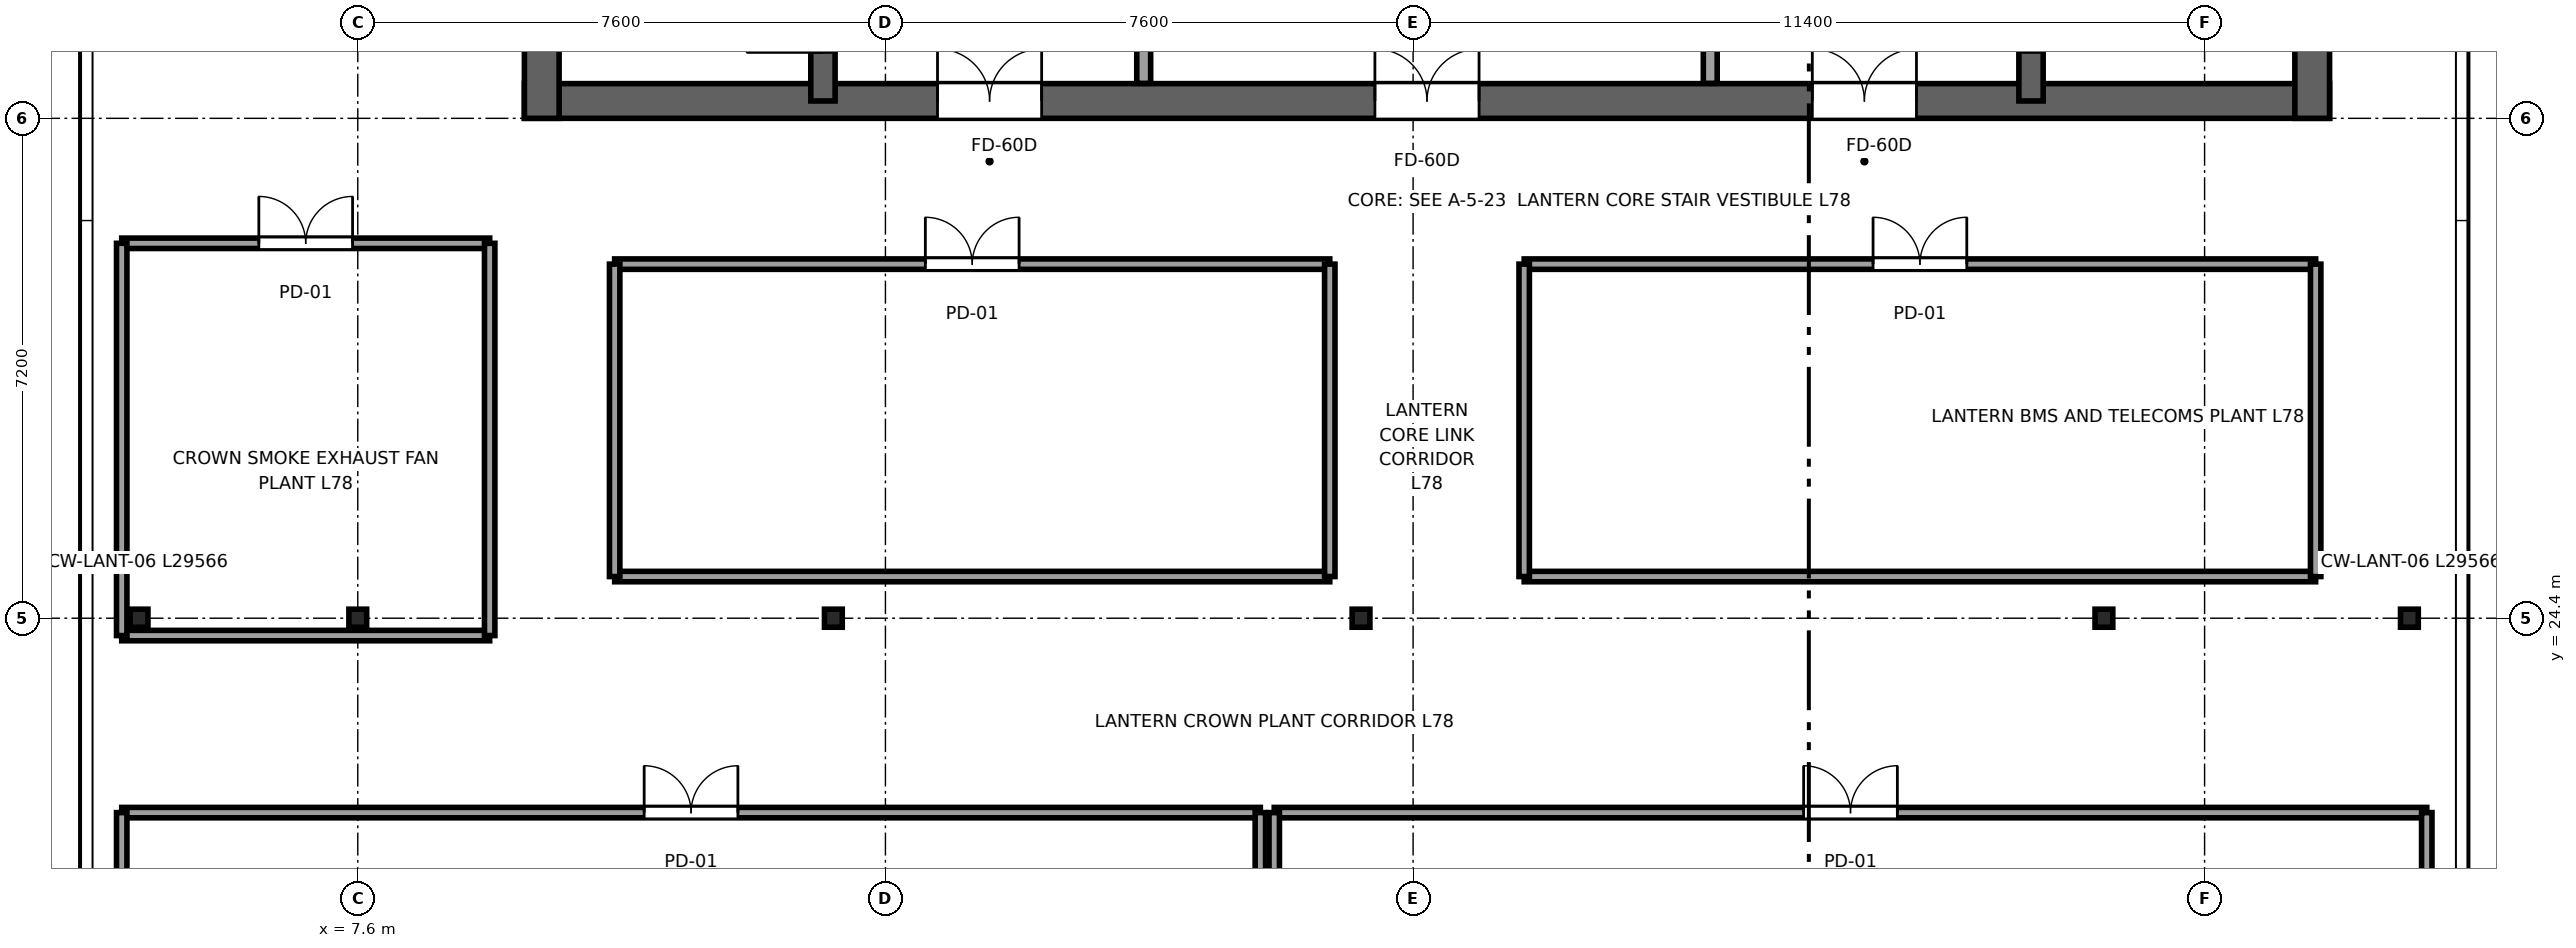
"""IFC4 building model, lengths in metres.
Left out: names, types, materials, properties, quantities, classifications, styles, units other than length and angle.
Written with IfcOpenShell. Run it as: python <this file> out.ifc"""

import sys

from ifc_helpers import new_model, si_unit, direction, frame, frame_2d, origin, origin_2d, place, context, subcontext, project, spatial, rectangle, i_section, extrude, source, transform, mapped, element, fill, save


model = new_model("IFC4")
c1 = context("Model", 3, precision=1e-05, world=origin(), true_north=direction((0.0, 1.0)))
c2 = subcontext(c1, "Body", "Model", "MODEL_VIEW")
j1 = project(units=[si_unit("LENGTHUNIT", "METRE"), si_unit("PLANEANGLEUNIT", "RADIAN")], contexts=[c1])
p1 = place(None, origin())
s1 = spatial("IfcSite", under=j1, at=p1, CompositionType="ELEMENT")
p2 = place(p1, origin())
s2 = spatial("IfcBuilding", under=s1, at=p2, CompositionType="ELEMENT")
p3 = place(p2, frame((0.0, 0.0, 294.75)))
s3 = spatial("IfcBuildingStorey", under=s2, at=p3, CompositionType="ELEMENT", Elevation=294.75)
p4 = place(p3, frame((10.0, 31.85, 0.0), z_axis=(0.0, 0.0, 1.0), x_axis=(1.0, 0.0, 0.0)))
e1 = element("IfcWall", 1, at=p4, inside=s3, PredefinedType="SHEAR", context=c2, shape_type="SweptSolid", body=[
    extrude(rectangle(XDim=26.0, YDim=0.5, at=frame_2d((13.0, 0.0))), origin(), (0.0, 0.0, 1.0), 3.8),
])
p5 = place(p4, frame((7.45, 0.0, 0.0), z_axis=(0.0, 0.0, 1.0), x_axis=(-1.0, 0.0, 0.0)))
e2 = element("IfcOpeningElement", 2, at=p5, cuts=e1, PredefinedType="OPENING", context=c2, shape_type="SweptSolid", body=[
    extrude(rectangle(XDim=1.5, YDim=2.04, at=frame_2d((0.75, 1.02))), frame((0.0, 0.26, 0.0), z_axis=(0.0, -1.0, 0.0), x_axis=(1.0, 0.0, 0.0)), (0.0, 0.0, 1.0), 0.52),
])
p6 = place(p4, frame((13.75, 0.0, 0.0), z_axis=(0.0, 0.0, 1.0), x_axis=(-1.0, 0.0, 0.0)))
e3 = element("IfcOpeningElement", 3, at=p6, cuts=e1, PredefinedType="OPENING", context=c2, shape_type="SweptSolid", body=[
    extrude(rectangle(XDim=1.5, YDim=2.04, at=frame_2d((0.75, 1.02))), frame((0.0, 0.26, 0.0), z_axis=(0.0, -1.0, 0.0), x_axis=(1.0, 0.0, 0.0)), (0.0, 0.0, 1.0), 0.52),
])
p7 = place(p4, frame((20.05, 0.0, 0.0), z_axis=(0.0, 0.0, 1.0), x_axis=(-1.0, 0.0, 0.0)))
e4 = element("IfcOpeningElement", 4, at=p7, cuts=e1, PredefinedType="OPENING", context=c2, shape_type="SweptSolid", body=[
    extrude(rectangle(XDim=1.5, YDim=2.04, at=frame_2d((0.75, 1.02))), frame((0.0, 0.26, 0.0), z_axis=(0.0, -1.0, 0.0), x_axis=(1.0, 0.0, 0.0)), (0.0, 0.0, 1.0), 0.52),
])
for number, where, z_axis, x_axis in (
    (5, (10.25, 31.6, 0.0), (0.0, 0.0, 1.0), (0.0, 1.0, 0.0)),
    (6, (35.75, 31.6, 0.0), (0.0, 0.0, 1.0), (0.0, 1.0, 0.0)),
):
    element("IfcWall", number, at=place(p3, frame(where, z_axis=z_axis, x_axis=x_axis)), inside=s3, PredefinedType="SHEAR", context=c2, shape_type="SweptSolid", body=[
        extrude(rectangle(XDim=12.6, YDim=0.5, at=frame_2d((6.3, 0.0))), origin(), (0.0, 0.0, 1.0), 3.8),
    ])
p8 = place(p3, frame((14.3, 31.85, 0.0), z_axis=(0.0, 0.0, 1.0), x_axis=(0.0, 1.0, 0.0)))
e7 = element("IfcWall", 7, at=p8, inside=s3, PredefinedType="SHEAR", context=c2, shape_type="SweptSolid", body=[
    extrude(rectangle(XDim=12.1, YDim=0.35, at=frame_2d((6.05, 0.0))), origin(), (0.0, 0.0, 1.0), 3.8),
])
p9 = place(p8, frame((0.7, 0.0, 0.0)))
e8 = element("IfcOpeningElement", 8, at=p9, cuts=e7, PredefinedType="OPENING", context=c2, shape_type="SweptSolid", body=[
    extrude(rectangle(XDim=1.1, YDim=2.12, at=frame_2d((0.55, 1.06))), frame((0.0, 0.185, 0.0), z_axis=(0.0, -1.0, 0.0), x_axis=(1.0, 0.0, 0.0)), (0.0, 0.0, 1.0), 0.37),
])
p10 = place(p3, frame((31.7, 31.85, 0.0), z_axis=(0.0, 0.0, 1.0), x_axis=(0.0, 1.0, 0.0)))
e9 = element("IfcWall", 9, at=p10, inside=s3, PredefinedType="SHEAR", context=c2, shape_type="SweptSolid", body=[
    extrude(rectangle(XDim=12.1, YDim=0.35, at=frame_2d((6.05, 0.0))), origin(), (0.0, 0.0, 1.0), 3.8),
])
p11 = place(p10, frame((1.8, 0.0, 0.0), z_axis=(0.0, 0.0, 1.0), x_axis=(-1.0, 0.0, 0.0)))
e10 = element("IfcOpeningElement", 10, at=p11, cuts=e9, PredefinedType="OPENING", context=c2, shape_type="SweptSolid", body=[
    extrude(rectangle(XDim=1.1, YDim=2.12, at=frame_2d((0.55, 1.06))), frame((0.0, 0.185, 0.0), z_axis=(0.0, -1.0, 0.0), x_axis=(1.0, 0.0, 0.0)), (0.0, 0.0, 1.0), 0.37),
])
m1 = source(origin(), c2, "Body", "SweptSolid", [
    extrude(i_section(OverallWidth=0.256, OverallDepth=0.26, WebThickness=0.01, FlangeThickness=0.017, FilletRadius=0.014, at=origin_2d()), origin(), (0.0, 0.0, 1.0), 3.8),
])
for number, where, z_axis, x_axis in (
    (11, (4.45, 24.4, 0.0), (0.0, 0.0, 1.0), (1.0, 0.0, 0.0)),
    (12, (7.6, 24.4, 0.0), (0.0, 0.0, 1.0), (1.0, 0.0, 0.0)),
    (13, (14.45, 24.4, 0.0), (0.0, 0.0, 1.0), (1.0, 0.0, 0.0)),
    (14, (22.05, 24.4, 0.0), (0.0, 0.0, 1.0), (1.0, 0.0, 0.0)),
    (15, (32.75, 24.4, 0.0), (0.0, 0.0, 1.0), (1.0, 0.0, 0.0)),
    (16, (37.15, 24.4, 0.0), (0.0, 0.0, 1.0), (1.0, 0.0, 0.0)),
):
    element("IfcColumn", number, at=place(p3, frame(where, z_axis=z_axis, x_axis=x_axis)), inside=s3, PredefinedType="COLUMN", context=c2, shape_type="MappedRepresentation", body=[
        mapped(m1, transform((0.0, 0.0, 0.0), x_axis=(1.0, 0.0, 0.0), y_axis=(0.0, 1.0, 0.0), z_axis=(0.0, 0.0, 1.0), scale=1.0)),
    ])
for number, where, z_axis, x_axis in (
    (17, (18.92, 32.104, 0.0), (0.0, 0.0, 1.0), (0.0, 1.0, 0.0)),
    (18, (27.08, 32.104, 0.0), (0.0, 0.0, 1.0), (0.0, 1.0, 0.0)),
):
    element("IfcWall", number, at=place(p3, frame(where, z_axis=z_axis, x_axis=x_axis)), inside=s3, PredefinedType="SOLIDWALL", context=c2, shape_type="SweptSolid", body=[
        extrude(rectangle(XDim=4.046, YDim=0.2, at=frame_2d((2.023, 0.0))), origin(), (0.0, 0.0, 1.0), 3.58),
    ])
p12 = place(p3, frame((4.2, 21.6, 0.0), z_axis=(0.0, 0.0, 1.0), x_axis=(1.0, 0.0, 0.0)))
e19 = element("IfcWall", 19, at=p12, inside=s3, PredefinedType="PARTITIONING", context=c2, shape_type="SweptSolid", body=[
    extrude(rectangle(XDim=16.4, YDim=0.15, at=frame_2d((8.2, 0.0))), origin(), (0.0, 0.0, 1.0), 3.58),
])
p13 = place(p12, frame((7.525, 0.0, 0.0)))
e20 = element("IfcOpeningElement", 20, at=p13, cuts=e19, PredefinedType="OPENING", context=c2, shape_type="SweptSolid", body=[
    extrude(rectangle(XDim=1.35, YDim=2.15, at=frame_2d((0.675, 1.075))), frame((0.0, 0.085, 0.0), z_axis=(0.0, -1.0, 0.0), x_axis=(1.0, 0.0, 0.0)), (0.0, 0.0, 1.0), 0.17),
])
for number, where, z_axis, x_axis in (
    (21, (4.2, 6.8, 0.0), (0.0, 0.0, 1.0), (0.0, 1.0, 0.0)),
    (22, (20.6, 6.8, 0.0), (0.0, 0.0, 1.0), (0.0, 1.0, 0.0)),
):
    element("IfcWall", number, at=place(p3, frame(where, z_axis=z_axis, x_axis=x_axis)), inside=s3, PredefinedType="PARTITIONING", context=c2, shape_type="SweptSolid", body=[
        extrude(rectangle(XDim=14.8, YDim=0.15, at=frame_2d((7.4, 0.0))), origin(), (0.0, 0.0, 1.0), 3.58),
    ])
p14 = place(p3, frame((20.8, 21.6, 0.0), z_axis=(0.0, 0.0, 1.0), x_axis=(1.0, 0.0, 0.0)))
e23 = element("IfcWall", 23, at=p14, inside=s3, PredefinedType="PARTITIONING", context=c2, shape_type="SweptSolid", body=[
    extrude(rectangle(XDim=16.6, YDim=0.15, at=frame_2d((8.3, 0.0))), origin(), (0.0, 0.0, 1.0), 3.58),
])
p15 = place(p14, frame((7.625, 0.0, 0.0)))
e24 = element("IfcOpeningElement", 24, at=p15, cuts=e23, PredefinedType="OPENING", context=c2, shape_type="SweptSolid", body=[
    extrude(rectangle(XDim=1.35, YDim=2.15, at=frame_2d((0.675, 1.075))), frame((0.0, 0.085, 0.0), z_axis=(0.0, -1.0, 0.0), x_axis=(1.0, 0.0, 0.0)), (0.0, 0.0, 1.0), 0.17),
])
for number, where, z_axis, x_axis in (
    (25, (20.8, 6.8, 0.0), (0.0, 0.0, 1.0), (0.0, 1.0, 0.0)),
    (26, (37.4, 6.8, 0.0), (0.0, 0.0, 1.0), (0.0, 1.0, 0.0)),
):
    element("IfcWall", number, at=place(p3, frame(where, z_axis=z_axis, x_axis=x_axis)), inside=s3, PredefinedType="PARTITIONING", context=c2, shape_type="SweptSolid", body=[
        extrude(rectangle(XDim=14.8, YDim=0.15, at=frame_2d((7.4, 0.0))), origin(), (0.0, 0.0, 1.0), 3.58),
    ])
p16 = place(p3, frame((4.2, 24.15, 0.0), z_axis=(0.0, 0.0, 1.0), x_axis=(1.0, 0.0, 0.0)))
e27 = element("IfcWall", 27, at=p16, inside=s3, PredefinedType="PARTITIONING", context=c2, shape_type="SweptSolid", body=[
    extrude(rectangle(XDim=5.3, YDim=0.15, at=frame_2d((2.65, 0.0))), origin(), (0.0, 0.0, 1.0), 3.58),
])
p17 = place(p3, frame((4.2, 29.8, 0.0), z_axis=(0.0, 0.0, 1.0), x_axis=(1.0, 0.0, 0.0)))
e28 = element("IfcWall", 28, at=p17, inside=s3, PredefinedType="PARTITIONING", context=c2, shape_type="SweptSolid", body=[
    extrude(rectangle(XDim=5.3, YDim=0.15, at=frame_2d((2.65, 0.0))), origin(), (0.0, 0.0, 1.0), 3.58),
])
p18 = place(p17, frame((1.975, 0.0, 0.0)))
e29 = element("IfcOpeningElement", 29, at=p18, cuts=e28, PredefinedType="OPENING", context=c2, shape_type="SweptSolid", body=[
    extrude(rectangle(XDim=1.35, YDim=2.15, at=frame_2d((0.675, 1.075))), frame((0.0, 0.085, 0.0), z_axis=(0.0, -1.0, 0.0), x_axis=(1.0, 0.0, 0.0)), (0.0, 0.0, 1.0), 0.17),
])
for number, where, z_axis, x_axis in (
    (30, (4.2, 24.15, 0.0), (0.0, 0.0, 1.0), (0.0, 1.0, 0.0)),
    (31, (9.5, 24.15, 0.0), (0.0, 0.0, 1.0), (0.0, 1.0, 0.0)),
):
    element("IfcWall", number, at=place(p3, frame(where, z_axis=z_axis, x_axis=x_axis)), inside=s3, PredefinedType="PARTITIONING", context=c2, shape_type="SweptSolid", body=[
        extrude(rectangle(XDim=5.65, YDim=0.15, at=frame_2d((2.825, 0.0))), origin(), (0.0, 0.0, 1.0), 3.58),
    ])
p19 = place(p3, frame((11.3, 25.0, 0.0), z_axis=(0.0, 0.0, 1.0), x_axis=(1.0, 0.0, 0.0)))
e32 = element("IfcWall", 32, at=p19, inside=s3, PredefinedType="PARTITIONING", context=c2, shape_type="SweptSolid", body=[
    extrude(rectangle(XDim=10.3, YDim=0.15, at=frame_2d((5.15, 0.0))), origin(), (0.0, 0.0, 1.0), 3.58),
])
p20 = place(p3, frame((11.3, 29.5, 0.0), z_axis=(0.0, 0.0, 1.0), x_axis=(1.0, 0.0, 0.0)))
e33 = element("IfcWall", 33, at=p20, inside=s3, PredefinedType="PARTITIONING", context=c2, shape_type="SweptSolid", body=[
    extrude(rectangle(XDim=10.3, YDim=0.15, at=frame_2d((5.15, 0.0))), origin(), (0.0, 0.0, 1.0), 3.58),
])
p21 = place(p20, frame((4.475, 0.0, 0.0)))
e34 = element("IfcOpeningElement", 34, at=p21, cuts=e33, PredefinedType="OPENING", context=c2, shape_type="SweptSolid", body=[
    extrude(rectangle(XDim=1.35, YDim=2.15, at=frame_2d((0.675, 1.075))), frame((0.0, 0.085, 0.0), z_axis=(0.0, -1.0, 0.0), x_axis=(1.0, 0.0, 0.0)), (0.0, 0.0, 1.0), 0.17),
])
p22 = place(p3, frame((11.3, 25.0, 0.0), z_axis=(0.0, 0.0, 1.0), x_axis=(0.0, 1.0, 0.0)))
e35 = element("IfcWall", 35, at=p22, inside=s3, PredefinedType="PARTITIONING", context=c2, shape_type="SweptSolid", body=[
    extrude(rectangle(XDim=4.5, YDim=0.15, at=frame_2d((2.25, 0.0))), origin(), (0.0, 0.0, 1.0), 3.314),
])
p23 = place(p3, frame((21.6, 25.0, 0.0), z_axis=(0.0, 0.0, 1.0), x_axis=(0.0, 1.0, 0.0)))
e36 = element("IfcWall", 36, at=p23, inside=s3, PredefinedType="PARTITIONING", context=c2, shape_type="SweptSolid", body=[
    extrude(rectangle(XDim=4.5, YDim=0.15, at=frame_2d((2.25, 0.0))), origin(), (0.0, 0.0, 1.0), 3.58),
])
p24 = place(p3, frame((24.4, 25.0, 0.0), z_axis=(0.0, 0.0, 1.0), x_axis=(1.0, 0.0, 0.0)))
e37 = element("IfcWall", 37, at=p24, inside=s3, PredefinedType="PARTITIONING", context=c2, shape_type="SweptSolid", body=[
    extrude(rectangle(XDim=11.4, YDim=0.15, at=frame_2d((5.7, 0.0))), origin(), (0.0, 0.0, 1.0), 3.58),
])
p25 = place(p3, frame((24.4, 29.5, 0.0), z_axis=(0.0, 0.0, 1.0), x_axis=(1.0, 0.0, 0.0)))
e38 = element("IfcWall", 38, at=p25, inside=s3, PredefinedType="PARTITIONING", context=c2, shape_type="SweptSolid", body=[
    extrude(rectangle(XDim=11.4, YDim=0.15, at=frame_2d((5.7, 0.0))), origin(), (0.0, 0.0, 1.0), 3.58),
])
p26 = place(p25, frame((5.025, 0.0, 0.0)))
e39 = element("IfcOpeningElement", 39, at=p26, cuts=e38, PredefinedType="OPENING", context=c2, shape_type="SweptSolid", body=[
    extrude(rectangle(XDim=1.35, YDim=2.15, at=frame_2d((0.675, 1.075))), frame((0.0, 0.085, 0.0), z_axis=(0.0, -1.0, 0.0), x_axis=(1.0, 0.0, 0.0)), (0.0, 0.0, 1.0), 0.17),
])
for number, where, z_axis, x_axis in (
    (40, (24.4, 25.0, 0.0), (0.0, 0.0, 1.0), (0.0, 1.0, 0.0)),
    (41, (35.8, 25.0, 0.0), (0.0, 0.0, 1.0), (0.0, 1.0, 0.0)),
):
    element("IfcWall", number, at=place(p3, frame(where, z_axis=z_axis, x_axis=x_axis)), inside=s3, PredefinedType="PARTITIONING", context=c2, shape_type="SweptSolid", body=[
        extrude(rectangle(XDim=4.5, YDim=0.15, at=frame_2d((2.25, 0.0))), origin(), (0.0, 0.0, 1.0), 3.58),
    ])
m2 = source(origin(), c2, "Body", "SweptSolid", [
    extrude(rectangle(XDim=1.5, YDim=2.04, at=frame_2d((0.75, 1.02))), frame((0.0, 0.025, 0.0), z_axis=(0.0, -1.0, 0.0), x_axis=(1.0, 0.0, 0.0)), (0.0, 0.0, 1.0), 0.05),
])
p27 = place(p5, origin())
e42 = element("IfcDoor", 42, at=p27, inside=s3, OperationType="DOUBLE_DOOR_SINGLE_SWING", PredefinedType="DOOR", context=c2, shape_type="MappedRepresentation", body=[
    mapped(m2, transform((0.0, 0.0, 0.0), x_axis=(1.0, 0.0, 0.0), y_axis=(0.0, 1.0, 0.0), z_axis=(0.0, 0.0, 1.0), scale=1.0)),
])
fill(e2, e42)
p28 = place(p6, origin())
e43 = element("IfcDoor", 43, at=p28, inside=s3, OperationType="DOUBLE_DOOR_SINGLE_SWING", PredefinedType="DOOR", context=c2, shape_type="MappedRepresentation", body=[
    mapped(m2, transform((0.0, 0.0, 0.0), x_axis=(1.0, 0.0, 0.0), y_axis=(0.0, 1.0, 0.0), z_axis=(0.0, 0.0, 1.0), scale=1.0)),
])
fill(e3, e43)
p29 = place(p7, origin())
e44 = element("IfcDoor", 44, at=p29, inside=s3, OperationType="DOUBLE_DOOR_SINGLE_SWING", PredefinedType="DOOR", context=c2, shape_type="MappedRepresentation", body=[
    mapped(m2, transform((0.0, 0.0, 0.0), x_axis=(1.0, 0.0, 0.0), y_axis=(0.0, 1.0, 0.0), z_axis=(0.0, 0.0, 1.0), scale=1.0)),
])
fill(e4, e44)
m3 = source(origin(), c2, "Body", "SweptSolid", [
    extrude(rectangle(XDim=1.35, YDim=2.15, at=frame_2d((0.675, 1.075))), frame((0.0, 0.025, 0.0), z_axis=(0.0, -1.0, 0.0), x_axis=(1.0, 0.0, 0.0)), (0.0, 0.0, 1.0), 0.05),
])
p30 = place(p13, origin())
e45 = element("IfcDoor", 45, at=p30, inside=s3, OperationType="DOUBLE_DOOR_SINGLE_SWING", PredefinedType="DOOR", context=c2, shape_type="MappedRepresentation", body=[
    mapped(m3, transform((0.0, 0.0, 0.0), x_axis=(1.0, 0.0, 0.0), y_axis=(0.0, 1.0, 0.0), z_axis=(0.0, 0.0, 1.0), scale=1.0)),
])
fill(e20, e45)
p31 = place(p15, origin())
e46 = element("IfcDoor", 46, at=p31, inside=s3, OperationType="DOUBLE_DOOR_SINGLE_SWING", PredefinedType="DOOR", context=c2, shape_type="MappedRepresentation", body=[
    mapped(m3, transform((0.0, 0.0, 0.0), x_axis=(1.0, 0.0, 0.0), y_axis=(0.0, 1.0, 0.0), z_axis=(0.0, 0.0, 1.0), scale=1.0)),
])
fill(e24, e46)
p32 = place(p18, origin())
e47 = element("IfcDoor", 47, at=p32, inside=s3, OperationType="DOUBLE_DOOR_SINGLE_SWING", PredefinedType="DOOR", context=c2, shape_type="MappedRepresentation", body=[
    mapped(m3, transform((0.0, 0.0, 0.0), x_axis=(1.0, 0.0, 0.0), y_axis=(0.0, 1.0, 0.0), z_axis=(0.0, 0.0, 1.0), scale=1.0)),
])
fill(e29, e47)
p33 = place(p21, origin())
e48 = element("IfcDoor", 48, at=p33, inside=s3, OperationType="DOUBLE_DOOR_SINGLE_SWING", PredefinedType="DOOR", context=c2, shape_type="MappedRepresentation", body=[
    mapped(m3, transform((0.0, 0.0, 0.0), x_axis=(1.0, 0.0, 0.0), y_axis=(0.0, 1.0, 0.0), z_axis=(0.0, 0.0, 1.0), scale=1.0)),
])
fill(e34, e48)
p34 = place(p26, origin())
e49 = element("IfcDoor", 49, at=p34, inside=s3, OperationType="DOUBLE_DOOR_SINGLE_SWING", PredefinedType="DOOR", context=c2, shape_type="MappedRepresentation", body=[
    mapped(m3, transform((0.0, 0.0, 0.0), x_axis=(1.0, 0.0, 0.0), y_axis=(0.0, 1.0, 0.0), z_axis=(0.0, 0.0, 1.0), scale=1.0)),
])
fill(e39, e49)
save(model, sys.argv[1])
